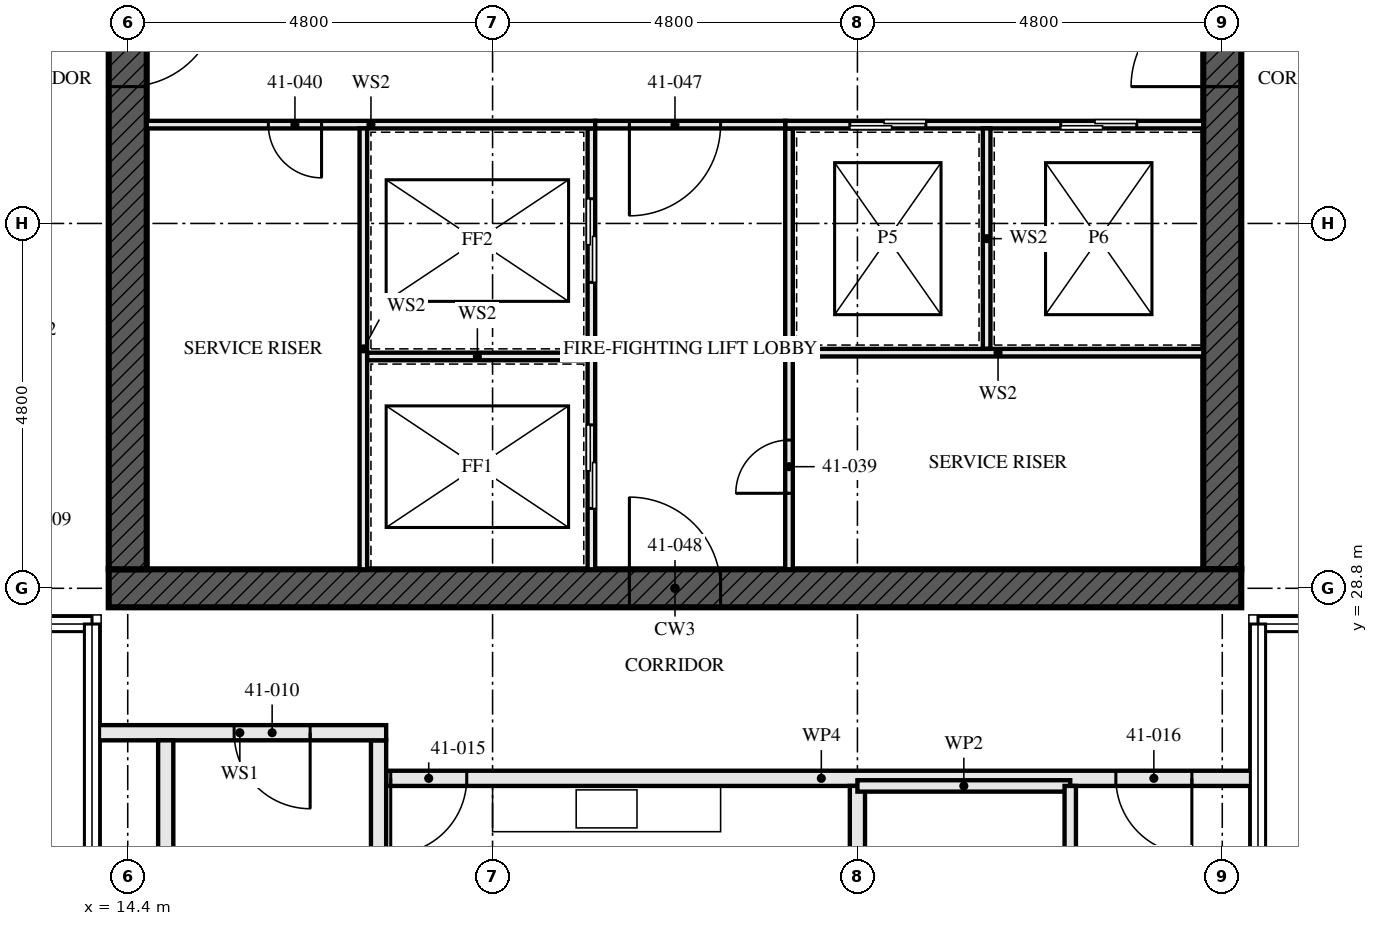
"""IFC4 building model, lengths in metres.
Left out: names, types, materials, properties, quantities, classifications, styles, units other than length and angle.
Written with IfcOpenShell. Run it as: python <this file> out.ifc"""

import sys

from ifc_helpers import new_model, si_unit, direction, frame, frame_2d, origin, place, context, subcontext, project, spatial, rectangle, extrude, element, fill, save


model = new_model("IFC4")
c1 = context("Model", 3, precision=1e-05, world=origin(), true_north=direction((0.0, 1.0)))
c2 = subcontext(c1, "Body", "Model", "MODEL_VIEW")
j1 = project(units=[si_unit("LENGTHUNIT", "METRE"), si_unit("PLANEANGLEUNIT", "RADIAN")], contexts=[c1])
p1 = place(None, origin())
s1 = spatial("IfcSite", under=j1, at=p1, CompositionType="ELEMENT")
p2 = place(p1, origin())
s2 = spatial("IfcBuilding", under=s1, at=p2, CompositionType="ELEMENT")
p3 = place(p2, frame((0.0, 0.0, 151.5)))
s3 = spatial("IfcBuildingStorey", under=s2, at=p3, CompositionType="ELEMENT", Elevation=151.5)
p4 = place(p3, frame((14.15, 28.8, -0.17), z_axis=(0.0, 0.0, 1.0), x_axis=(1.0, 0.0, 0.0)))
e1 = element("IfcWall", 1, at=p4, inside=s3, PredefinedType="SHEAR", context=c2, shape_type="SweptSolid", body=[
    extrude(rectangle(XDim=14.9, YDim=0.5, at=frame_2d((7.45, 0.0))), origin(), (0.0, 0.0, 1.0), 3.5),
])
p5 = place(p4, frame((6.85, 0.0, 0.17)))
e2 = element("IfcOpeningElement", 2, at=p5, cuts=e1, PredefinedType="OPENING", context=c2, shape_type="SweptSolid", body=[
    extrude(rectangle(XDim=1.2, YDim=2.1, at=frame_2d((0.6, 1.05))), frame((0.0, 0.26, 0.0), z_axis=(0.0, -1.0, 0.0), x_axis=(1.0, 0.0, 0.0)), (0.0, 0.0, 1.0), 0.521),
])
p6 = place(p3, frame((14.4, 42.95, -0.17), z_axis=(0.0, 0.0, 1.0), x_axis=(0.0, -1.0, 0.0)))
e3 = element("IfcWall", 3, at=p6, inside=s3, PredefinedType="SHEAR", context=c2, shape_type="SweptSolid", body=[
    extrude(rectangle(XDim=13.9, YDim=0.5, at=frame_2d((6.95, 0.0))), origin(), (0.0, 0.0, 1.0), 3.5),
])
p7 = place(p6, frame((6.35, 0.0, 0.17)))
e4 = element("IfcOpeningElement", 4, at=p7, cuts=e3, PredefinedType="OPENING", context=c2, shape_type="SweptSolid", body=[
    extrude(rectangle(XDim=1.2, YDim=2.1, at=frame_2d((0.6, 1.05))), frame((0.0, 0.26, 0.0), z_axis=(0.0, -1.0, 0.0), x_axis=(1.0, 0.0, 0.0)), (0.0, 0.0, 1.0), 0.521),
])
p8 = place(p3, frame((28.8, 29.05, -0.17), z_axis=(0.0, 0.0, 1.0), x_axis=(0.0, 1.0, 0.0)))
e5 = element("IfcWall", 5, at=p8, inside=s3, PredefinedType="SHEAR", context=c2, shape_type="SweptSolid", body=[
    extrude(rectangle(XDim=13.9, YDim=0.5, at=frame_2d((6.95, 0.0))), origin(), (0.0, 0.0, 1.0), 3.5),
])
p9 = place(p8, frame((6.35, 0.0, 0.17)))
e6 = element("IfcOpeningElement", 6, at=p9, cuts=e5, PredefinedType="OPENING", context=c2, shape_type="SweptSolid", body=[
    extrude(rectangle(XDim=1.2, YDim=2.1, at=frame_2d((0.6, 1.05))), frame((0.0, 0.26, 0.0), z_axis=(0.0, -1.0, 0.0), x_axis=(1.0, 0.0, 0.0)), (0.0, 0.0, 1.0), 0.521),
])
for number, where, z_axis, x_axis in (
    (7, (14.9, 22.1, 0.0), (0.0, 0.0, 1.0), (0.0, 1.0, 0.0)),
    (8, (17.7, 22.1, 0.0), (0.0, 0.0, 1.0), (0.0, 1.0, 0.0)),
):
    element("IfcWall", number, at=place(p3, frame(where, z_axis=z_axis, x_axis=x_axis)), inside=s3, PredefinedType="SOLIDWALL", context=c2, shape_type="SweptSolid", body=[
        extrude(rectangle(XDim=4.7, YDim=0.2, at=frame_2d((2.35, 0.0))), origin(), (0.0, 0.0, 1.0), 2.99),
    ])
p10 = place(p3, frame((13.95, 26.9, 0.0), z_axis=(0.0, 0.0, 1.0), x_axis=(1.0, 0.0, 0.0)))
e9 = element("IfcWall", 9, at=p10, inside=s3, PredefinedType="SOLIDWALL", context=c2, shape_type="SweptSolid", body=[
    extrude(rectangle(XDim=3.85, YDim=0.2, at=frame_2d((1.925, 0.0))), origin(), (0.0, 0.0, 1.0), 2.32),
])
p11 = place(p10, frame((1.85, 0.0, 0.0)))
e10 = element("IfcOpeningElement", 10, at=p11, cuts=e9, PredefinedType="OPENING", context=c2, shape_type="SweptSolid", body=[
    extrude(rectangle(XDim=1.0, YDim=2.1, at=frame_2d((0.5, 1.05))), frame((0.0, 0.111, 0.0), z_axis=(0.0, -1.0, 0.0), x_axis=(1.0, 0.0, 0.0)), (0.0, 0.0, 1.0), 0.221),
])
p12 = place(p3, frame((24.0, 19.52, 0.0), z_axis=(0.0, 0.0, 1.0), x_axis=(0.0, 1.0, 0.0)))
e11 = element("IfcWall", 11, at=p12, inside=s3, PredefinedType="PARTITIONING", context=c2, shape_type="SweptSolid", body=[
    extrude(rectangle(XDim=6.68, YDim=0.2, at=frame_2d((3.34, 0.0))), origin(), (0.0, 0.0, 1.0), 2.55),
])
p13 = place(p3, frame((26.8, 23.2, 0.0), z_axis=(0.0, 0.0, 1.0), x_axis=(0.0, 1.0, 0.0)))
e12 = element("IfcWall", 12, at=p13, inside=s3, PredefinedType="PARTITIONING", context=c2, shape_type="SweptSolid", body=[
    extrude(rectangle(XDim=3.0, YDim=0.15, at=frame_2d((1.5, 0.0))), origin(), (0.0, 0.0, 1.0), 2.55),
])
p14 = place(p13, frame((1.05, 0.0, 0.0)))
e13 = element("IfcOpeningElement", 13, at=p14, cuts=e12, PredefinedType="OPENING", context=c2, shape_type="SweptSolid", body=[
    extrude(rectangle(XDim=0.9, YDim=2.1, at=frame_2d((0.45, 1.05))), frame((0.0, 0.085, 0.0), z_axis=(0.0, -1.0, 0.0), x_axis=(1.0, 0.0, 0.0)), (0.0, 0.0, 1.0), 0.171),
])
p15 = place(p3, frame((24.0, 26.2, 0.0), z_axis=(0.0, 0.0, 1.0), x_axis=(1.0, 0.0, 0.0)))
e14 = element("IfcWall", 14, at=p15, inside=s3, PredefinedType="PARTITIONING", context=c2, shape_type="SweptSolid", body=[
    extrude(rectangle(XDim=2.8, YDim=0.15, at=frame_2d((1.4, 0.0))), origin(), (0.0, 0.0, 1.0), 3.33),
])
p16 = place(p3, frame((17.8, 26.3, 0.0), z_axis=(0.0, 0.0, 1.0), x_axis=(1.0, 0.0, 0.0)))
e15 = element("IfcWall", 15, at=p16, inside=s3, PredefinedType="PARTITIONING", context=c2, shape_type="SweptSolid", body=[
    extrude(rectangle(XDim=11.45, YDim=0.2, at=frame_2d((5.725, 0.0))), origin(), (0.0, 0.0, 1.0), 2.32),
])
p17 = place(p16, frame((0.06, 0.0, 0.0)))
e16 = element("IfcOpeningElement", 16, at=p17, cuts=e15, PredefinedType="OPENING", context=c2, shape_type="SweptSolid", body=[
    extrude(rectangle(XDim=1.0, YDim=2.1, at=frame_2d((0.5, 1.05))), frame((0.0, 0.111, 0.0), z_axis=(0.0, -1.0, 0.0), x_axis=(1.0, 0.0, 0.0)), (0.0, 0.0, 1.0), 0.221),
])
p18 = place(p16, frame((9.6, 0.0, 0.0)))
e17 = element("IfcOpeningElement", 17, at=p18, cuts=e15, PredefinedType="OPENING", context=c2, shape_type="SweptSolid", body=[
    extrude(rectangle(XDim=1.0, YDim=2.1, at=frame_2d((0.5, 1.05))), frame((0.0, 0.111, 0.0), z_axis=(0.0, -1.0, 0.0), x_axis=(1.0, 0.0, 0.0)), (0.0, 0.0, 1.0), 0.221),
])
p19 = place(p3, frame((20.5, 29.05, 0.0), z_axis=(0.0, 0.0, 1.0), x_axis=(0.0, 1.0, 0.0)))
e18 = element("IfcWall", 18, at=p19, inside=s3, PredefinedType="SOLIDWALL", context=c2, shape_type="SweptSolid", body=[
    extrude(rectangle(XDim=5.8, YDim=0.1, at=frame_2d((2.9, 0.0))), origin(), (0.0, 0.0, 1.0), 3.33),
])
p20 = place(p19, frame((0.8, 0.0, 0.0)))
e19 = element("IfcOpeningElement", 19, at=p20, cuts=e18, PredefinedType="OPENING", context=c2, shape_type="SweptSolid", body=[
    extrude(rectangle(XDim=1.1, YDim=2.3, at=frame_2d((0.55, 1.15))), frame((0.0, 0.061, 0.0), z_axis=(0.0, -1.0, 0.0), x_axis=(1.0, 0.0, 0.0)), (0.0, 0.0, 1.0), 0.121),
])
p21 = place(p19, frame((3.775, 0.0, 0.0)))
e20 = element("IfcOpeningElement", 20, at=p21, cuts=e18, PredefinedType="OPENING", context=c2, shape_type="SweptSolid", body=[
    extrude(rectangle(XDim=1.1, YDim=2.3, at=frame_2d((0.55, 1.15))), frame((0.0, 0.061, 0.0), z_axis=(0.0, -1.0, 0.0), x_axis=(1.0, 0.0, 0.0)), (0.0, 0.0, 1.0), 0.121),
])
p22 = place(p3, frame((23.1, 29.05, 0.0), z_axis=(0.0, 0.0, 1.0), x_axis=(0.0, 1.0, 0.0)))
e21 = element("IfcWall", 21, at=p22, inside=s3, PredefinedType="SOLIDWALL", context=c2, shape_type="SweptSolid", body=[
    extrude(rectangle(XDim=5.8, YDim=0.1, at=frame_2d((2.9, 0.0))), origin(), (0.0, 0.0, 1.0), 3.33),
])
p23 = place(p22, frame((1.0, 0.0, 0.0)))
e22 = element("IfcOpeningElement", 22, at=p23, cuts=e21, PredefinedType="OPENING", context=c2, shape_type="SweptSolid", body=[
    extrude(rectangle(XDim=0.7, YDim=2.1, at=frame_2d((0.35, 1.05))), frame((0.0, 0.061, 0.0), z_axis=(0.0, -1.0, 0.0), x_axis=(1.0, 0.0, 0.0)), (0.0, 0.0, 1.0), 0.121),
])
p24 = place(p3, frame((14.65, 34.9, 0.0), z_axis=(0.0, 0.0, 1.0), x_axis=(1.0, 0.0, 0.0)))
e23 = element("IfcWall", 23, at=p24, inside=s3, PredefinedType="SOLIDWALL", context=c2, shape_type="SweptSolid", body=[
    extrude(rectangle(XDim=5.9, YDim=0.1, at=frame_2d((2.95, 0.0))), origin(), (0.0, 0.0, 1.0), 3.33),
])
p25 = place(p24, frame((1.6, 0.0, 0.0)))
e24 = element("IfcOpeningElement", 24, at=p25, cuts=e23, PredefinedType="OPENING", context=c2, shape_type="SweptSolid", body=[
    extrude(rectangle(XDim=0.7, YDim=2.1, at=frame_2d((0.35, 1.05))), frame((0.0, 0.061, 0.0), z_axis=(0.0, -1.0, 0.0), x_axis=(1.0, 0.0, 0.0)), (0.0, 0.0, 1.0), 0.121),
])
p26 = place(p3, frame((23.05, 34.9, 0.0), z_axis=(0.0, 0.0, 1.0), x_axis=(1.0, 0.0, 0.0)))
e25 = element("IfcWall", 25, at=p26, inside=s3, PredefinedType="SOLIDWALL", context=c2, shape_type="SweptSolid", body=[
    extrude(rectangle(XDim=5.5, YDim=0.1, at=frame_2d((2.75, 0.0))), origin(), (0.0, 0.0, 1.0), 3.33),
])
p27 = place(p26, frame((0.85, 0.0, 0.0)))
e26 = element("IfcOpeningElement", 26, at=p27, cuts=e25, PredefinedType="OPENING", context=c2, shape_type="SweptSolid", body=[
    extrude(rectangle(XDim=1.0, YDim=2.1, at=frame_2d((0.5, 1.05))), frame((0.0, 0.061, 0.0), z_axis=(0.0, -1.0, 0.0), x_axis=(1.0, 0.0, 0.0)), (0.0, 0.0, 1.0), 0.121),
])
p28 = place(p26, frame((3.625, 0.0, 0.0)))
e27 = element("IfcOpeningElement", 27, at=p28, cuts=e25, PredefinedType="OPENING", context=c2, shape_type="SweptSolid", body=[
    extrude(rectangle(XDim=1.0, YDim=2.1, at=frame_2d((0.5, 1.05))), frame((0.0, 0.061, 0.0), z_axis=(0.0, -1.0, 0.0), x_axis=(1.0, 0.0, 0.0)), (0.0, 0.0, 1.0), 0.121),
])
p29 = place(p3, frame((20.55, 34.9, 0.0), z_axis=(0.0, 0.0, 1.0), x_axis=(1.0, 0.0, 0.0)))
e28 = element("IfcWall", 28, at=p29, inside=s3, PredefinedType="SOLIDWALL", context=c2, shape_type="SweptSolid", body=[
    extrude(rectangle(XDim=2.5, YDim=0.1, at=frame_2d((1.25, 0.0))), origin(), (0.0, 0.0, 1.0), 3.33),
])
p30 = place(p29, frame((0.45, 0.0, 0.0)))
e29 = element("IfcOpeningElement", 29, at=p30, cuts=e28, PredefinedType="OPENING", context=c2, shape_type="SweptSolid", body=[
    extrude(rectangle(XDim=1.2, YDim=2.1, at=frame_2d((0.6, 1.05))), frame((0.0, 0.061, 0.0), z_axis=(0.0, -1.0, 0.0), x_axis=(1.0, 0.0, 0.0)), (0.0, 0.0, 1.0), 0.121),
])
p31 = place(p3, frame((17.5, 29.05, 0.0), z_axis=(0.0, 0.0, 1.0), x_axis=(0.0, 1.0, 0.0)))
e30 = element("IfcWall", 30, at=p31, inside=s3, PredefinedType="SOLIDWALL", context=c2, shape_type="SweptSolid", body=[
    extrude(rectangle(XDim=5.8, YDim=0.1, at=frame_2d((2.9, 0.0))), origin(), (0.0, 0.0, 1.0), 3.33),
])
p32 = place(p3, frame((17.55, 31.85, 0.0), z_axis=(0.0, 0.0, 1.0), x_axis=(1.0, 0.0, 0.0)))
e31 = element("IfcWall", 31, at=p32, inside=s3, PredefinedType="SOLIDWALL", context=c2, shape_type="SweptSolid", body=[
    extrude(rectangle(XDim=2.9, YDim=0.1, at=frame_2d((1.45, 0.0))), origin(), (0.0, 0.0, 1.0), 3.33),
])
p33 = place(p3, frame((25.7, 31.95, 0.0), z_axis=(0.0, 0.0, 1.0), x_axis=(0.0, 1.0, 0.0)))
e32 = element("IfcWall", 32, at=p33, inside=s3, PredefinedType="SOLIDWALL", context=c2, shape_type="SweptSolid", body=[
    extrude(rectangle(XDim=2.9, YDim=0.1, at=frame_2d((1.45, 0.0))), origin(), (0.0, 0.0, 1.0), 3.33),
])
p34 = place(p3, frame((23.15, 31.9, 0.0), z_axis=(0.0, 0.0, 1.0), x_axis=(1.0, 0.0, 0.0)))
e33 = element("IfcWall", 33, at=p34, inside=s3, PredefinedType="SOLIDWALL", context=c2, shape_type="SweptSolid", body=[
    extrude(rectangle(XDim=5.4, YDim=0.1, at=frame_2d((2.7, 0.0))), origin(), (0.0, 0.0, 1.0), 3.33),
])
p35 = place(p11, frame((1.0, 0.0, 0.0), z_axis=(0.0, 0.0, 1.0), x_axis=(-1.0, 0.0, 0.0)))
e34 = element("IfcDoor", 34, at=p35, inside=s3, OperationType="SINGLE_SWING_RIGHT", PredefinedType="DOOR", context=c2, shape_type="SweptSolid", body=[
    extrude(rectangle(XDim=1.0, YDim=2.1, at=frame_2d((0.5, 1.05))), frame((0.0, 0.032, 0.0), z_axis=(0.0, -1.0, 0.0), x_axis=(1.0, 0.0, 0.0)), (0.0, 0.0, 1.0), 0.064),
])
fill(e10, e34)
p36 = place(p17, frame((1.0, 0.0, 0.0), z_axis=(0.0, 0.0, 1.0), x_axis=(-1.0, 0.0, 0.0)))
e35 = element("IfcDoor", 35, at=p36, inside=s3, OperationType="SINGLE_SWING_LEFT", PredefinedType="DOOR", context=c2, shape_type="SweptSolid", body=[
    extrude(rectangle(XDim=1.0, YDim=2.1, at=frame_2d((0.5, 1.05))), frame((0.0, 0.027, 0.0), z_axis=(0.0, -1.0, 0.0), x_axis=(1.0, 0.0, 0.0)), (0.0, 0.0, 1.0), 0.054),
])
fill(e16, e35)
p37 = place(p18, frame((1.0, 0.0, 0.0), z_axis=(0.0, 0.0, 1.0), x_axis=(-1.0, 0.0, 0.0)))
e36 = element("IfcDoor", 36, at=p37, inside=s3, OperationType="SINGLE_SWING_RIGHT", PredefinedType="DOOR", context=c2, shape_type="SweptSolid", body=[
    extrude(rectangle(XDim=1.0, YDim=2.1, at=frame_2d((0.5, 1.05))), frame((0.0, 0.027, 0.0), z_axis=(0.0, -1.0, 0.0), x_axis=(1.0, 0.0, 0.0)), (0.0, 0.0, 1.0), 0.054),
])
fill(e17, e36)
p38 = place(p20, origin())
e37 = element("IfcDoor", 37, at=p38, inside=s3, OperationType="SLIDING_TO_LEFT", PredefinedType="DOOR", context=c2, shape_type="SweptSolid", body=[
    extrude(rectangle(XDim=1.1, YDim=2.3, at=frame_2d((0.55, 1.15))), frame((0.0, 0.05, 0.0), z_axis=(0.0, -1.0, 0.0), x_axis=(1.0, 0.0, 0.0)), (0.0, 0.0, 1.0), 0.1),
])
fill(e19, e37)
p39 = place(p21, origin())
e38 = element("IfcDoor", 38, at=p39, inside=s3, OperationType="SLIDING_TO_LEFT", PredefinedType="DOOR", context=c2, shape_type="SweptSolid", body=[
    extrude(rectangle(XDim=1.1, YDim=2.3, at=frame_2d((0.55, 1.15))), frame((0.0, 0.05, 0.0), z_axis=(0.0, -1.0, 0.0), x_axis=(1.0, 0.0, 0.0)), (0.0, 0.0, 1.0), 0.1),
])
fill(e20, e38)
p40 = place(p23, origin())
e39 = element("IfcDoor", 39, at=p40, inside=s3, OperationType="SINGLE_SWING_RIGHT", PredefinedType="DOOR", context=c2, shape_type="SweptSolid", body=[
    extrude(rectangle(XDim=0.7, YDim=2.1, at=frame_2d((0.35, 1.05))), frame((0.0, 0.027, 0.0), z_axis=(0.0, -1.0, 0.0), x_axis=(1.0, 0.0, 0.0)), (0.0, 0.0, 1.0), 0.054),
])
fill(e22, e39)
p41 = place(p25, frame((0.7, 0.0, 0.0), z_axis=(0.0, 0.0, 1.0), x_axis=(-1.0, 0.0, 0.0)))
e40 = element("IfcDoor", 40, at=p41, inside=s3, OperationType="SINGLE_SWING_RIGHT", PredefinedType="DOOR", context=c2, shape_type="SweptSolid", body=[
    extrude(rectangle(XDim=0.7, YDim=2.1, at=frame_2d((0.35, 1.05))), frame((0.0, 0.027, 0.0), z_axis=(0.0, -1.0, 0.0), x_axis=(1.0, 0.0, 0.0)), (0.0, 0.0, 1.0), 0.054),
])
fill(e24, e40)
p42 = place(p27, origin())
e41 = element("IfcDoor", 41, at=p42, inside=s3, OperationType="SLIDING_TO_LEFT", PredefinedType="DOOR", context=c2, shape_type="SweptSolid", body=[
    extrude(rectangle(XDim=1.0, YDim=2.1, at=frame_2d((0.5, 1.05))), frame((0.0, 0.05, 0.0), z_axis=(0.0, -1.0, 0.0), x_axis=(1.0, 0.0, 0.0)), (0.0, 0.0, 1.0), 0.1),
])
fill(e26, e41)
p43 = place(p28, origin())
e42 = element("IfcDoor", 42, at=p43, inside=s3, OperationType="SLIDING_TO_LEFT", PredefinedType="DOOR", context=c2, shape_type="SweptSolid", body=[
    extrude(rectangle(XDim=1.0, YDim=2.1, at=frame_2d((0.5, 1.05))), frame((0.0, 0.05, 0.0), z_axis=(0.0, -1.0, 0.0), x_axis=(1.0, 0.0, 0.0)), (0.0, 0.0, 1.0), 0.1),
])
fill(e27, e42)
p44 = place(p30, frame((1.2, 0.0, 0.0), z_axis=(0.0, 0.0, 1.0), x_axis=(-1.0, 0.0, 0.0)))
e43 = element("IfcDoor", 43, at=p44, inside=s3, OperationType="SINGLE_SWING_LEFT", PredefinedType="DOOR", context=c2, shape_type="SweptSolid", body=[
    extrude(rectangle(XDim=1.2, YDim=2.1, at=frame_2d((0.6, 1.05))), frame((0.0, 0.027, 0.0), z_axis=(0.0, -1.0, 0.0), x_axis=(1.0, 0.0, 0.0)), (0.0, 0.0, 1.0), 0.054),
])
fill(e29, e43)
p45 = place(p5, origin())
e44 = element("IfcDoor", 44, at=p45, inside=s3, OperationType="SINGLE_SWING_LEFT", PredefinedType="DOOR", context=c2, shape_type="SweptSolid", body=[
    extrude(rectangle(XDim=1.2, YDim=2.1, at=frame_2d((0.6, 1.05))), frame((0.0, 0.027, 0.0), z_axis=(0.0, -1.0, 0.0), x_axis=(1.0, 0.0, 0.0)), (0.0, 0.0, 1.0), 0.054),
])
fill(e2, e44)
p46 = place(p7, origin())
e45 = element("IfcDoor", 45, at=p46, inside=s3, OperationType="SINGLE_SWING_LEFT", PredefinedType="DOOR", context=c2, shape_type="SweptSolid", body=[
    extrude(rectangle(XDim=1.2, YDim=2.1, at=frame_2d((0.6, 1.05))), frame((0.0, 0.027, 0.0), z_axis=(0.0, -1.0, 0.0), x_axis=(1.0, 0.0, 0.0)), (0.0, 0.0, 1.0), 0.054),
])
fill(e4, e45)
p47 = place(p9, origin())
e46 = element("IfcDoor", 46, at=p47, inside=s3, OperationType="SINGLE_SWING_LEFT", PredefinedType="DOOR", context=c2, shape_type="SweptSolid", body=[
    extrude(rectangle(XDim=1.2, YDim=2.1, at=frame_2d((0.6, 1.05))), frame((0.0, 0.027, 0.0), z_axis=(0.0, -1.0, 0.0), x_axis=(1.0, 0.0, 0.0)), (0.0, 0.0, 1.0), 0.054),
])
fill(e6, e46)
save(model, sys.argv[1])
